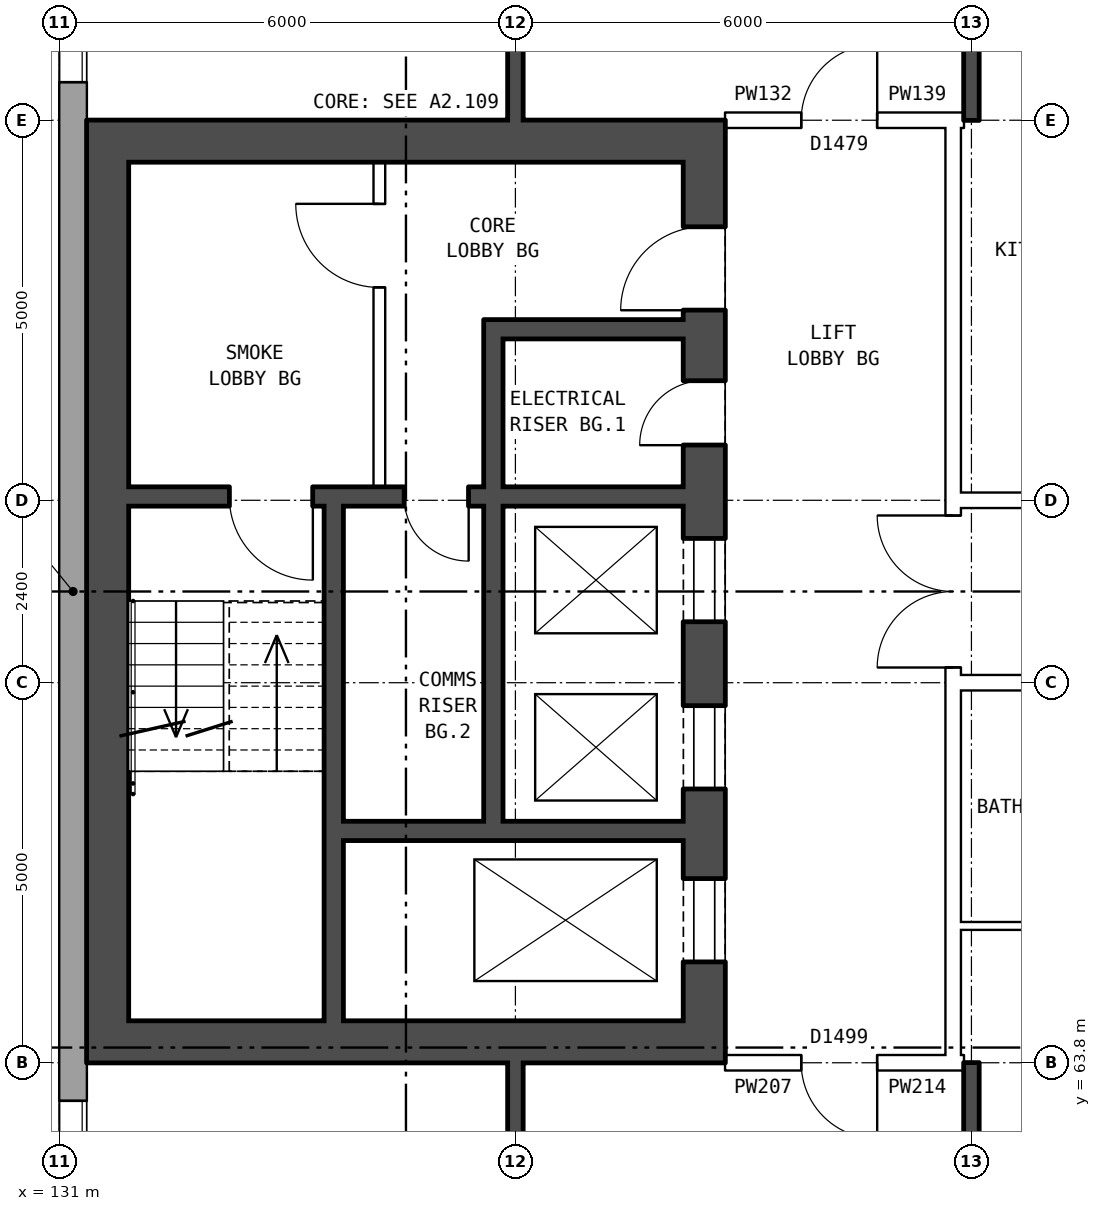
"""IFC4 building model, lengths in metres.
Left out: names, types, materials, properties, quantities, classifications, styles, units other than length and angle.
Written with IfcOpenShell. Run it as: python <this file> out.ifc"""

import sys

from ifc_helpers import new_model, si_unit, direction, frame, frame_2d, origin, place, context, subcontext, project, spatial, rectangle, extrude, element, fill, save


model = new_model("IFC4")
c1 = context("Model", 3, precision=1e-05, world=origin(), true_north=direction((0.0, 1.0)))
c2 = subcontext(c1, "Body", "Model", "MODEL_VIEW")
j1 = project(units=[si_unit("LENGTHUNIT", "METRE"), si_unit("PLANEANGLEUNIT", "RADIAN")], contexts=[c1])
p1 = place(None, origin())
s1 = spatial("IfcSite", under=j1, at=p1, CompositionType="ELEMENT")
p2 = place(p1, origin())
s2 = spatial("IfcBuilding", under=s1, at=p2, CompositionType="ELEMENT")
p3 = place(p2, frame((0.0, 0.0, 139.2)))
s3 = spatial("IfcBuildingStorey", under=s2, at=p3, CompositionType="ELEMENT", Elevation=139.2)
p4 = place(p3, frame((131.18, 82.925, 0.0), z_axis=(0.0, 0.0, 1.0), x_axis=(0.0, -1.0, 0.0)))
e1 = element("IfcWall", 1, at=p4, inside=s3, PredefinedType="STANDARD", context=c2, shape_type="SweptSolid", body=[
    extrude(rectangle(XDim=25.851, YDim=0.36, at=frame_2d((12.925, 0.0))), origin(), (0.0, 0.0, 1.0), 2.85),
])
p5 = place(p4, frame((1.625, 0.0, 0.8)))
e2 = element("IfcOpeningElement", 2, at=p5, cuts=e1, PredefinedType="OPENING", context=c2, shape_type="SweptSolid", body=[
    extrude(rectangle(XDim=1.6, YDim=1.8, at=frame_2d((0.8, 0.9))), frame((0.0, 0.19, 0.0), z_axis=(0.0, -1.0, 0.0), x_axis=(1.0, 0.0, 0.0)), (0.0, 0.0, 1.0), 0.38),
])
p6 = place(p4, frame((4.625, 0.0, 0.8)))
e3 = element("IfcOpeningElement", 3, at=p6, cuts=e1, PredefinedType="OPENING", context=c2, shape_type="SweptSolid", body=[
    extrude(rectangle(XDim=1.6, YDim=1.8, at=frame_2d((0.8, 0.9))), frame((0.0, 0.19, 0.0), z_axis=(0.0, -1.0, 0.0), x_axis=(1.0, 0.0, 0.0)), (0.0, 0.0, 1.0), 0.38),
])
p7 = place(p4, frame((19.625, 0.0, 0.8)))
e4 = element("IfcOpeningElement", 4, at=p7, cuts=e1, PredefinedType="OPENING", context=c2, shape_type="SweptSolid", body=[
    extrude(rectangle(XDim=1.6, YDim=1.8, at=frame_2d((0.8, 0.9))), frame((0.0, 0.19, 0.0), z_axis=(0.0, -1.0, 0.0), x_axis=(1.0, 0.0, 0.0)), (0.0, 0.0, 1.0), 0.38),
])
p8 = place(p4, frame((22.625, 0.0, 0.8)))
e5 = element("IfcOpeningElement", 5, at=p8, cuts=e1, PredefinedType="OPENING", context=c2, shape_type="SweptSolid", body=[
    extrude(rectangle(XDim=1.6, YDim=1.8, at=frame_2d((0.8, 0.9))), frame((0.0, 0.19, 0.0), z_axis=(0.0, -1.0, 0.0), x_axis=(1.0, 0.0, 0.0)), (0.0, 0.0, 1.0), 0.38),
])
p9 = place(p3, frame((139.485, 63.8, 0.0), z_axis=(0.0, 0.0, 1.0), x_axis=(0.0, 1.0, 0.0)))
e6 = element("IfcWall", 6, at=p9, inside=s3, PredefinedType="SHEAR", context=c2, shape_type="SweptSolid", body=[
    extrude(rectangle(XDim=12.4, YDim=0.55, at=frame_2d((6.2, 0.0))), origin(), (0.0, 0.0, 1.0), 2.85),
])
p10 = place(p9, frame((1.325, 0.0, 0.0)))
e7 = element("IfcOpeningElement", 7, at=p10, cuts=e6, PredefinedType="OPENING", context=c2, shape_type="SweptSolid", body=[
    extrude(rectangle(XDim=1.1, YDim=2.1, at=frame_2d((0.55, 1.05))), frame((0.0, 0.285, 0.0), z_axis=(0.0, -1.0, 0.0), x_axis=(1.0, 0.0, 0.0)), (0.0, 0.0, 1.0), 0.57),
])
p11 = place(p9, frame((3.6, 0.0, 0.0)))
e8 = element("IfcOpeningElement", 8, at=p11, cuts=e6, PredefinedType="OPENING", context=c2, shape_type="SweptSolid", body=[
    extrude(rectangle(XDim=1.1, YDim=2.1, at=frame_2d((0.55, 1.05))), frame((0.0, 0.285, 0.0), z_axis=(0.0, -1.0, 0.0), x_axis=(1.0, 0.0, 0.0)), (0.0, 0.0, 1.0), 0.57),
])
p12 = place(p9, frame((5.8, 0.0, 0.0)))
e9 = element("IfcOpeningElement", 9, at=p12, cuts=e6, PredefinedType="OPENING", context=c2, shape_type="SweptSolid", body=[
    extrude(rectangle(XDim=1.1, YDim=2.1, at=frame_2d((0.55, 1.05))), frame((0.0, 0.285, 0.0), z_axis=(0.0, -1.0, 0.0), x_axis=(1.0, 0.0, 0.0)), (0.0, 0.0, 1.0), 0.57),
])
p13 = place(p9, frame((9.9, 0.0, 0.0)))
e10 = element("IfcOpeningElement", 10, at=p13, cuts=e6, PredefinedType="OPENING", context=c2, shape_type="SweptSolid", body=[
    extrude(rectangle(XDim=1.1, YDim=2.1, at=frame_2d((0.55, 1.05))), frame((0.0, 0.285, 0.0), z_axis=(0.0, -1.0, 0.0), x_axis=(1.0, 0.0, 0.0)), (0.0, 0.0, 1.0), 0.57),
])
p14 = place(p9, frame((8.125, 0.0, 0.0)))
e11 = element("IfcOpeningElement", 11, at=p14, cuts=e6, PredefinedType="OPENING", context=c2, shape_type="SweptSolid", body=[
    extrude(rectangle(XDim=0.85, YDim=2.1, at=frame_2d((0.425, 1.05))), frame((0.0, 0.285, 0.0), z_axis=(0.0, -1.0, 0.0), x_axis=(1.0, 0.0, 0.0)), (0.0, 0.0, 1.0), 0.57),
])
p15 = place(p3, frame((131.635, 63.8, 0.0), z_axis=(0.0, 0.0, 1.0), x_axis=(0.0, 1.0, 0.0)))
e12 = element("IfcWall", 12, at=p15, inside=s3, PredefinedType="SHEAR", context=c2, shape_type="SweptSolid", body=[
    extrude(rectangle(XDim=12.4, YDim=0.55, at=frame_2d((6.2, 0.0))), origin(), (0.0, 0.0, 1.0), 2.85),
])
for number, where, z_axis, x_axis in (
    (13, (139.21, 64.075, 0.0), (0.0, 0.0, 1.0), (-1.0, 0.0, 0.0)),
    (14, (139.21, 75.925, 0.0), (0.0, 0.0, 1.0), (-1.0, 0.0, 0.0)),
):
    element("IfcWall", number, at=place(p3, frame(where, z_axis=z_axis, x_axis=x_axis)), inside=s3, PredefinedType="SHEAR", context=c2, shape_type="SweptSolid", body=[
        extrude(rectangle(XDim=7.3, YDim=0.55, at=frame_2d((3.65, 0.0))), origin(), (0.0, 0.0, 1.0), 2.85),
    ])
p16 = place(p3, frame((139.21, 66.85, 0.0), z_axis=(0.0, 0.0, 1.0), x_axis=(-1.0, 0.0, 0.0)))
e15 = element("IfcWall", 15, at=p16, inside=s3, PredefinedType="SHEAR", context=c2, shape_type="SweptSolid", body=[
    extrude(rectangle(XDim=4.475, YDim=0.25, at=frame_2d((2.237, 0.0))), origin(), (0.0, 0.0, 1.0), 2.85),
])
p17 = place(p3, frame((139.21, 71.25, 0.0), z_axis=(0.0, 0.0, 1.0), x_axis=(-1.0, 0.0, 0.0)))
e16 = element("IfcWall", 16, at=p17, inside=s3, PredefinedType="SHEAR", context=c2, shape_type="SweptSolid", body=[
    extrude(rectangle(XDim=7.3, YDim=0.25, at=frame_2d((3.65, 0.0))), origin(), (0.0, 0.0, 1.0), 2.85),
])
p18 = place(p17, frame((4.875, 0.0, 0.0)))
e17 = element("IfcOpeningElement", 17, at=p18, cuts=e16, PredefinedType="OPENING", context=c2, shape_type="SweptSolid", body=[
    extrude(rectangle(XDim=1.1, YDim=2.1, at=frame_2d((0.55, 1.05))), frame((0.0, 0.135, 0.0), z_axis=(0.0, -1.0, 0.0), x_axis=(1.0, 0.0, 0.0)), (0.0, 0.0, 1.0), 0.27),
])
p19 = place(p17, frame((2.825, 0.0, 0.0)))
e18 = element("IfcOpeningElement", 18, at=p19, cuts=e16, PredefinedType="OPENING", context=c2, shape_type="SweptSolid", body=[
    extrude(rectangle(XDim=0.85, YDim=2.1, at=frame_2d((0.425, 1.05))), frame((0.0, 0.135, 0.0), z_axis=(0.0, -1.0, 0.0), x_axis=(1.0, 0.0, 0.0)), (0.0, 0.0, 1.0), 0.27),
])
p20 = place(p3, frame((139.21, 73.45, 0.0), z_axis=(0.0, 0.0, 1.0), x_axis=(-1.0, 0.0, 0.0)))
e19 = element("IfcWall", 19, at=p20, inside=s3, PredefinedType="SHEAR", context=c2, shape_type="SweptSolid", body=[
    extrude(rectangle(XDim=2.375, YDim=0.25, at=frame_2d((1.188, 0.0))), origin(), (0.0, 0.0, 1.0), 2.85),
])
p21 = place(p3, frame((136.71, 66.975, 0.0), z_axis=(0.0, 0.0, 1.0), x_axis=(0.0, 1.0, 0.0)))
e20 = element("IfcWall", 20, at=p21, inside=s3, PredefinedType="SHEAR", context=c2, shape_type="SweptSolid", body=[
    extrude(rectangle(XDim=4.15, YDim=0.25, at=frame_2d((2.075, 0.0))), origin(), (0.0, 0.0, 1.0), 2.85),
])
p22 = place(p3, frame((136.71, 71.375, 0.0), z_axis=(0.0, 0.0, 1.0), x_axis=(0.0, 1.0, 0.0)))
e21 = element("IfcWall", 21, at=p22, inside=s3, PredefinedType="SHEAR", context=c2, shape_type="SweptSolid", body=[
    extrude(rectangle(XDim=2.2, YDim=0.25, at=frame_2d((1.1, 0.0))), origin(), (0.0, 0.0, 1.0), 2.85),
])
p23 = place(p3, frame((135.21, 71.375, 0.0), z_axis=(0.0, 0.0, 1.0), x_axis=(0.0, 1.0, 0.0)))
e22 = element("IfcWall", 22, at=p23, inside=s3, PredefinedType="PARTITIONING", context=c2, shape_type="SweptSolid", body=[
    extrude(rectangle(XDim=4.275, YDim=0.15, at=frame_2d((2.137, 0.0))), origin(), (0.0, 0.0, 1.0), 2.85),
])
p24 = place(p23, frame((2.625, 0.0, 0.0)))
e23 = element("IfcOpeningElement", 23, at=p24, cuts=e22, PredefinedType="OPENING", context=c2, shape_type="SweptSolid", body=[
    extrude(rectangle(XDim=1.1, YDim=2.1, at=frame_2d((0.55, 1.05))), frame((0.0, 0.085, 0.0), z_axis=(0.0, -1.0, 0.0), x_axis=(1.0, 0.0, 0.0)), (0.0, 0.0, 1.0), 0.17),
])
p25 = place(p3, frame((134.61, 64.35, 0.0), z_axis=(0.0, 0.0, 1.0), x_axis=(0.0, 1.0, 0.0)))
e24 = element("IfcWall", 24, at=p25, inside=s3, PredefinedType="SHEAR", context=c2, shape_type="SweptSolid", body=[
    extrude(rectangle(XDim=6.775, YDim=0.25, at=frame_2d((3.387, 0.0))), origin(), (0.0, 0.0, 1.0), 2.85),
])
p26 = place(p3, frame((142.76, 63.9, 0.0), z_axis=(0.0, 0.0, 1.0), x_axis=(0.0, 1.0, 0.0)))
e25 = element("IfcWall", 25, at=p26, inside=s3, PredefinedType="PARTITIONING", context=c2, shape_type="SweptSolid", body=[
    extrude(rectangle(XDim=12.2, YDim=0.2, at=frame_2d((6.1, 0.0))), origin(), (0.0, 0.0, 1.0), 2.85),
])
p27 = place(p26, frame((5.1, 0.0, 0.0)))
e26 = element("IfcOpeningElement", 26, at=p27, cuts=e25, PredefinedType="OPENING", context=c2, shape_type="SweptSolid", body=[
    extrude(rectangle(XDim=2.0, YDim=2.1, at=frame_2d((1.0, 1.05))), frame((0.0, 0.11, 0.0), z_axis=(0.0, -1.0, 0.0), x_axis=(1.0, 0.0, 0.0)), (0.0, 0.0, 1.0), 0.22),
])
p28 = place(p3, frame((139.76, 63.8, 0.0), z_axis=(0.0, 0.0, 1.0), x_axis=(1.0, 0.0, 0.0)))
e27 = element("IfcWall", 27, at=p28, inside=s3, PredefinedType="PARTITIONING", context=c2, shape_type="SweptSolid", body=[
    extrude(rectangle(XDim=3.0, YDim=0.2, at=frame_2d((1.5, 0.0))), origin(), (0.0, 0.0, 1.0), 2.85),
])
p29 = place(p28, frame((1.0, 0.0, 0.0)))
e28 = element("IfcOpeningElement", 28, at=p29, cuts=e27, PredefinedType="OPENING", context=c2, shape_type="SweptSolid", body=[
    extrude(rectangle(XDim=1.0, YDim=2.1, at=frame_2d((0.5, 1.05))), frame((0.0, 0.11, 0.0), z_axis=(0.0, -1.0, 0.0), x_axis=(1.0, 0.0, 0.0)), (0.0, 0.0, 1.0), 0.22),
])
p30 = place(p3, frame((142.76, 63.8, 0.0), z_axis=(0.0, 0.0, 1.0), x_axis=(1.0, 0.0, 0.0)))
e29 = element("IfcWall", 29, at=p30, inside=s3, PredefinedType="PARTITIONING", context=c2, shape_type="SweptSolid", body=[
    extrude(rectangle(XDim=0.14, YDim=0.2, at=frame_2d((0.07, 0.0))), origin(), (0.0, 0.0, 1.0), 2.85),
])
p31 = place(p3, frame((142.76, 65.6, 0.0), z_axis=(0.0, 0.0, 1.0), x_axis=(1.0, 0.0, 0.0)))
e30 = element("IfcWall", 30, at=p31, inside=s3, PredefinedType="PARTITIONING", context=c2, shape_type="SweptSolid", body=[
    extrude(rectangle(XDim=3.24, YDim=0.1, at=frame_2d((1.62, 0.0))), origin(), (0.0, 0.0, 1.0), 2.85),
])
p32 = place(p3, frame((142.76, 68.8, 0.0), z_axis=(0.0, 0.0, 1.0), x_axis=(1.0, 0.0, 0.0)))
e31 = element("IfcWall", 31, at=p32, inside=s3, PredefinedType="PARTITIONING", context=c2, shape_type="SweptSolid", body=[
    extrude(rectangle(XDim=14.48, YDim=0.2, at=frame_2d((7.24, 0.0))), origin(), (0.0, 0.0, 1.0), 2.85),
])
p33 = place(p32, frame((4.24, 0.0, 0.0)))
e32 = element("IfcOpeningElement", 32, at=p33, cuts=e31, PredefinedType="OPENING", context=c2, shape_type="SweptSolid", body=[
    extrude(rectangle(XDim=1.0, YDim=2.1, at=frame_2d((0.5, 1.05))), frame((0.0, 0.11, 0.0), z_axis=(0.0, -1.0, 0.0), x_axis=(1.0, 0.0, 0.0)), (0.0, 0.0, 1.0), 0.22),
])
p34 = place(p32, frame((10.24, 0.0, 0.0)))
e33 = element("IfcOpeningElement", 33, at=p34, cuts=e31, PredefinedType="OPENING", context=c2, shape_type="SweptSolid", body=[
    extrude(rectangle(XDim=1.0, YDim=2.1, at=frame_2d((0.5, 1.05))), frame((0.0, 0.11, 0.0), z_axis=(0.0, -1.0, 0.0), x_axis=(1.0, 0.0, 0.0)), (0.0, 0.0, 1.0), 0.22),
])
p35 = place(p3, frame((142.76, 71.2, 0.0), z_axis=(0.0, 0.0, 1.0), x_axis=(1.0, 0.0, 0.0)))
e34 = element("IfcWall", 34, at=p35, inside=s3, PredefinedType="PARTITIONING", context=c2, shape_type="SweptSolid", body=[
    extrude(rectangle(XDim=14.48, YDim=0.2, at=frame_2d((7.24, 0.0))), origin(), (0.0, 0.0, 1.0), 2.85),
])
p36 = place(p35, frame((1.12, 0.0, 0.0)))
e35 = element("IfcOpeningElement", 35, at=p36, cuts=e34, PredefinedType="OPENING", context=c2, shape_type="SweptSolid", body=[
    extrude(rectangle(XDim=1.0, YDim=2.1, at=frame_2d((0.5, 1.05))), frame((0.0, 0.11, 0.0), z_axis=(0.0, -1.0, 0.0), x_axis=(1.0, 0.0, 0.0)), (0.0, 0.0, 1.0), 0.22),
])
p37 = place(p35, frame((10.24, 0.0, 0.0)))
e36 = element("IfcOpeningElement", 36, at=p37, cuts=e34, PredefinedType="OPENING", context=c2, shape_type="SweptSolid", body=[
    extrude(rectangle(XDim=1.0, YDim=2.1, at=frame_2d((0.5, 1.05))), frame((0.0, 0.11, 0.0), z_axis=(0.0, -1.0, 0.0), x_axis=(1.0, 0.0, 0.0)), (0.0, 0.0, 1.0), 0.22),
])
p38 = place(p3, frame((139.76, 76.2, 0.0), z_axis=(0.0, 0.0, 1.0), x_axis=(1.0, 0.0, 0.0)))
e37 = element("IfcWall", 37, at=p38, inside=s3, PredefinedType="PARTITIONING", context=c2, shape_type="SweptSolid", body=[
    extrude(rectangle(XDim=3.0, YDim=0.2, at=frame_2d((1.5, 0.0))), origin(), (0.0, 0.0, 1.0), 2.85),
])
p39 = place(p38, frame((1.0, 0.0, 0.0)))
e38 = element("IfcOpeningElement", 38, at=p39, cuts=e37, PredefinedType="OPENING", context=c2, shape_type="SweptSolid", body=[
    extrude(rectangle(XDim=1.0, YDim=2.1, at=frame_2d((0.5, 1.05))), frame((0.0, 0.11, 0.0), z_axis=(0.0, -1.0, 0.0), x_axis=(1.0, 0.0, 0.0)), (0.0, 0.0, 1.0), 0.22),
])
p40 = place(p3, frame((142.76, 76.2, 0.0), z_axis=(0.0, 0.0, 1.0), x_axis=(1.0, 0.0, 0.0)))
e39 = element("IfcWall", 39, at=p40, inside=s3, PredefinedType="PARTITIONING", context=c2, shape_type="SweptSolid", body=[
    extrude(rectangle(XDim=0.14, YDim=0.2, at=frame_2d((0.07, 0.0))), origin(), (0.0, 0.0, 1.0), 2.85),
])
p41 = place(p3, frame((137.0, 54.36, 0.0), z_axis=(0.0, 0.0, 1.0), x_axis=(0.0, 1.0, 0.0)))
e40 = element("IfcWall", 40, at=p41, inside=s3, PredefinedType="SOLIDWALL", context=c2, shape_type="SweptSolid", body=[
    extrude(rectangle(XDim=9.44, YDim=0.2, at=frame_2d((4.72, 0.0))), origin(), (0.0, 0.0, 1.0), 2.85),
])
p42 = place(p41, frame((7.34, 0.0, 0.0)))
e41 = element("IfcOpeningElement", 41, at=p42, cuts=e40, PredefinedType="OPENING", context=c2, shape_type="SweptSolid", body=[
    extrude(rectangle(XDim=0.9, YDim=2.1, at=frame_2d((0.45, 1.05))), frame((0.0, 0.11, 0.0), z_axis=(0.0, -1.0, 0.0), x_axis=(1.0, 0.0, 0.0)), (0.0, 0.0, 1.0), 0.22),
])
p43 = place(p3, frame((137.0, 76.2, 0.0), z_axis=(0.0, 0.0, 1.0), x_axis=(0.0, 1.0, 0.0)))
e42 = element("IfcWall", 42, at=p43, inside=s3, PredefinedType="SOLIDWALL", context=c2, shape_type="SweptSolid", body=[
    extrude(rectangle(XDim=9.44, YDim=0.2, at=frame_2d((4.72, 0.0))), origin(), (0.0, 0.0, 1.0), 2.85),
])
p44 = place(p43, frame((1.35, 0.0, 0.0)))
e43 = element("IfcOpeningElement", 43, at=p44, cuts=e42, PredefinedType="OPENING", context=c2, shape_type="SweptSolid", body=[
    extrude(rectangle(XDim=0.9, YDim=2.1, at=frame_2d((0.45, 1.05))), frame((0.0, 0.11, 0.0), z_axis=(0.0, -1.0, 0.0), x_axis=(1.0, 0.0, 0.0)), (0.0, 0.0, 1.0), 0.22),
])
for number, where, z_axis, x_axis in (
    (44, (143.0, 54.36, 0.0), (0.0, 0.0, 1.0), (0.0, 1.0, 0.0)),
    (45, (143.0, 76.2, 0.0), (0.0, 0.0, 1.0), (0.0, 1.0, 0.0)),
):
    element("IfcWall", number, at=place(p3, frame(where, z_axis=z_axis, x_axis=x_axis)), inside=s3, PredefinedType="SOLIDWALL", context=c2, shape_type="SweptSolid", body=[
        extrude(rectangle(XDim=9.44, YDim=0.2, at=frame_2d((4.72, 0.0))), origin(), (0.0, 0.0, 1.0), 2.85),
    ])
p45 = place(p6, origin())
e46 = element("IfcWindow", 46, at=p45, inside=s3, PartitioningType="SINGLE_PANEL", PredefinedType="WINDOW", context=c2, shape_type="SweptSolid", body=[
    extrude(rectangle(XDim=1.6, YDim=1.8, at=frame_2d((0.8, 0.9))), frame((0.0, 0.15, 0.0), z_axis=(0.0, -1.0, 0.0), x_axis=(1.0, 0.0, 0.0)), (0.0, 0.0, 1.0), 0.06),
])
fill(e3, e46)
p46 = place(p7, origin())
e47 = element("IfcWindow", 47, at=p46, inside=s3, PartitioningType="SINGLE_PANEL", PredefinedType="WINDOW", context=c2, shape_type="SweptSolid", body=[
    extrude(rectangle(XDim=1.6, YDim=1.8, at=frame_2d((0.8, 0.9))), frame((0.0, 0.15, 0.0), z_axis=(0.0, -1.0, 0.0), x_axis=(1.0, 0.0, 0.0)), (0.0, 0.0, 1.0), 0.06),
])
fill(e4, e47)
p47 = place(p10, origin())
e48 = element("IfcDoor", 48, at=p47, inside=s3, OperationType="DOUBLE_DOOR_SLIDING", PredefinedType="DOOR", context=c2, shape_type="SweptSolid", body=[
    extrude(rectangle(XDim=1.1, YDim=2.1, at=frame_2d((0.55, 1.05))), frame((0.0, 0.26, 0.0), z_axis=(0.0, -1.0, 0.0), x_axis=(1.0, 0.0, 0.0)), (0.0, 0.0, 1.0), 0.05),
])
fill(e7, e48)
p48 = place(p11, origin())
e49 = element("IfcDoor", 49, at=p48, inside=s3, OperationType="DOUBLE_DOOR_SLIDING", PredefinedType="DOOR", context=c2, shape_type="SweptSolid", body=[
    extrude(rectangle(XDim=1.1, YDim=2.1, at=frame_2d((0.55, 1.05))), frame((0.0, 0.26, 0.0), z_axis=(0.0, -1.0, 0.0), x_axis=(1.0, 0.0, 0.0)), (0.0, 0.0, 1.0), 0.05),
])
fill(e8, e49)
p49 = place(p12, origin())
e50 = element("IfcDoor", 50, at=p49, inside=s3, OperationType="DOUBLE_DOOR_SLIDING", PredefinedType="DOOR", context=c2, shape_type="SweptSolid", body=[
    extrude(rectangle(XDim=1.1, YDim=2.1, at=frame_2d((0.55, 1.05))), frame((0.0, 0.26, 0.0), z_axis=(0.0, -1.0, 0.0), x_axis=(1.0, 0.0, 0.0)), (0.0, 0.0, 1.0), 0.05),
])
fill(e9, e50)
p50 = place(p13, origin())
e51 = element("IfcDoor", 51, at=p50, inside=s3, OperationType="SINGLE_SWING_LEFT", PredefinedType="DOOR", context=c2, shape_type="SweptSolid", body=[
    extrude(rectangle(XDim=1.1, YDim=2.1, at=frame_2d((0.55, 1.05))), frame((0.0, 0.26, 0.0), z_axis=(0.0, -1.0, 0.0), x_axis=(1.0, 0.0, 0.0)), (0.0, 0.0, 1.0), 0.05),
])
fill(e10, e51)
p51 = place(p24, origin())
e52 = element("IfcDoor", 52, at=p51, inside=s3, OperationType="SINGLE_SWING_RIGHT", PredefinedType="DOOR", context=c2, shape_type="SweptSolid", body=[
    extrude(rectangle(XDim=1.1, YDim=2.1, at=frame_2d((0.55, 1.05))), frame((0.0, 0.025, 0.0), z_axis=(0.0, -1.0, 0.0), x_axis=(1.0, 0.0, 0.0)), (0.0, 0.0, 1.0), 0.05),
])
fill(e23, e52)
p52 = place(p18, origin())
e53 = element("IfcDoor", 53, at=p52, inside=s3, OperationType="SINGLE_SWING_LEFT", PredefinedType="DOOR", context=c2, shape_type="SweptSolid", body=[
    extrude(rectangle(XDim=1.1, YDim=2.1, at=frame_2d((0.55, 1.05))), frame((0.0, 0.025, 0.0), z_axis=(0.0, -1.0, 0.0), x_axis=(1.0, 0.0, 0.0)), (0.0, 0.0, 1.0), 0.05),
])
fill(e17, e53)
p53 = place(p14, origin())
e54 = element("IfcDoor", 54, at=p53, inside=s3, OperationType="SINGLE_SWING_LEFT", PredefinedType="DOOR", context=c2, shape_type="SweptSolid", body=[
    extrude(rectangle(XDim=0.85, YDim=2.1, at=frame_2d((0.425, 1.05))), frame((0.0, 0.26, 0.0), z_axis=(0.0, -1.0, 0.0), x_axis=(1.0, 0.0, 0.0)), (0.0, 0.0, 1.0), 0.05),
])
fill(e11, e54)
p54 = place(p19, origin())
e55 = element("IfcDoor", 55, at=p54, inside=s3, OperationType="SINGLE_SWING_LEFT", PredefinedType="DOOR", context=c2, shape_type="SweptSolid", body=[
    extrude(rectangle(XDim=0.85, YDim=2.1, at=frame_2d((0.425, 1.05))), frame((0.0, 0.025, 0.0), z_axis=(0.0, -1.0, 0.0), x_axis=(1.0, 0.0, 0.0)), (0.0, 0.0, 1.0), 0.05),
])
fill(e18, e55)
p55 = place(p27, origin())
e56 = element("IfcDoor", 56, at=p55, inside=s3, OperationType="DOUBLE_DOOR_SINGLE_SWING", PredefinedType="DOOR", context=c2, shape_type="SweptSolid", body=[
    extrude(rectangle(XDim=2.0, YDim=2.1, at=frame_2d((1.0, 1.05))), frame((0.0, 0.025, 0.0), z_axis=(0.0, -1.0, 0.0), x_axis=(1.0, 0.0, 0.0)), (0.0, 0.0, 1.0), 0.05),
])
fill(e26, e56)
p56 = place(p29, frame((1.0, 0.0, 0.0), z_axis=(0.0, 0.0, 1.0), x_axis=(-1.0, 0.0, 0.0)))
e57 = element("IfcDoor", 57, at=p56, inside=s3, OperationType="SINGLE_SWING_LEFT", PredefinedType="DOOR", context=c2, shape_type="SweptSolid", body=[
    extrude(rectangle(XDim=1.0, YDim=2.1, at=frame_2d((0.5, 1.05))), frame((0.0, 0.025, 0.0), z_axis=(0.0, -1.0, 0.0), x_axis=(1.0, 0.0, 0.0)), (0.0, 0.0, 1.0), 0.05),
])
fill(e28, e57)
p57 = place(p39, origin())
e58 = element("IfcDoor", 58, at=p57, inside=s3, OperationType="SINGLE_SWING_RIGHT", PredefinedType="DOOR", context=c2, shape_type="SweptSolid", body=[
    extrude(rectangle(XDim=1.0, YDim=2.1, at=frame_2d((0.5, 1.05))), frame((0.0, 0.025, 0.0), z_axis=(0.0, -1.0, 0.0), x_axis=(1.0, 0.0, 0.0)), (0.0, 0.0, 1.0), 0.05),
])
fill(e38, e58)
save(model, sys.argv[1])
